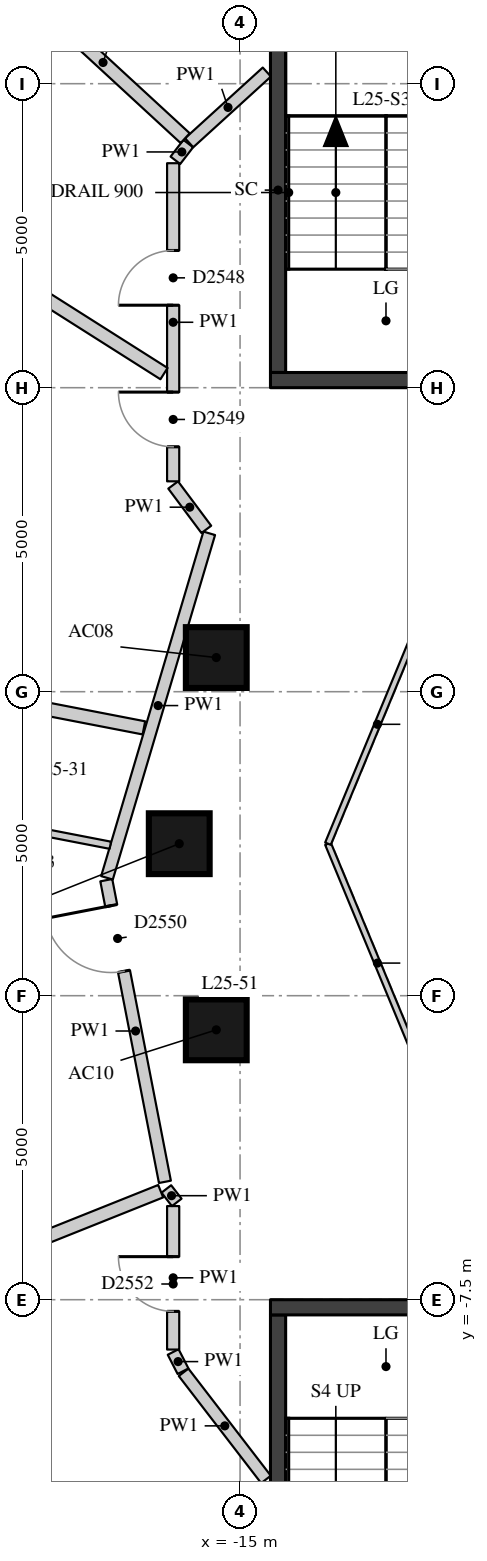
"""IFC4 building model, lengths in metres.
Left out: names, types, materials, properties, quantities, classifications, styles, units other than length and angle.
Written with IfcOpenShell. Run it as: python <this file> out.ifc"""

import sys

from ifc_helpers import new_model, si_unit, direction, frame, frame_2d, origin, origin_2d, place, context, subcontext, project, spatial, rectangle, extrude, element, fill, save


model = new_model("IFC4")
c1 = context("Model", 3, precision=1e-05, world=origin(), true_north=direction((0.0, 1.0)))
c2 = subcontext(c1, "Body", "Model", "MODEL_VIEW")
j1 = project(units=[si_unit("LENGTHUNIT", "METRE"), si_unit("PLANEANGLEUNIT", "RADIAN")], contexts=[c1])
p1 = place(None, origin())
s1 = spatial("IfcSite", under=j1, at=p1, CompositionType="ELEMENT")
p2 = place(p1, origin())
s2 = spatial("IfcBuilding", under=s1, at=p2, CompositionType="ELEMENT")
p3 = place(p2, frame((0.0, 0.0, 92.2)))
s3 = spatial("IfcBuildingStorey", under=s2, at=p3, CompositionType="ELEMENT", Elevation=92.2)
for number, where, z_axis, x_axis in (
    (1, (-15.391, 3.062, 0.0), (0.0, 0.0, 1.0), (1.0, 0.0, 0.0)),
    (2, (-16.0, 0.0, 0.0), (0.0, 0.0, 1.0), (1.0, 0.0, 0.0)),
    (3, (-15.391, -3.062, 0.0), (0.0, 0.0, 1.0), (1.0, 0.0, 0.0)),
):
    element("IfcColumn", number, at=place(p3, frame(where, z_axis=z_axis, x_axis=x_axis)), inside=s3, PredefinedType="COLUMN", context=c2, shape_type="SweptSolid", body=[
        extrude(rectangle(XDim=1.0, YDim=1.0, at=origin_2d()), origin(), (0.0, 0.0, 1.0), 3.3),
    ])
p4 = place(p3, frame((-14.375, 7.75, -0.28), z_axis=(0.0, 0.0, 1.0), x_axis=(0.0, 1.0, 0.0)))
e4 = element("IfcWall", 4, at=p4, inside=s3, PredefinedType="SHEAR", context=c2, shape_type="SweptSolid", body=[
    extrude(rectangle(XDim=6.0, YDim=0.25, at=frame_2d((3.0, 0.0))), origin(), (0.0, 0.0, 1.0), 3.3),
])
p5 = place(p3, frame((-14.5, 7.625, -0.28), z_axis=(0.0, 0.0, 1.0), x_axis=(1.0, 0.0, 0.0)))
e5 = element("IfcWall", 5, at=p5, inside=s3, PredefinedType="SHEAR", context=c2, shape_type="SweptSolid", body=[
    extrude(rectangle(XDim=5.2, YDim=0.25, at=frame_2d((2.6, 0.0))), origin(), (0.0, 0.0, 1.0), 3.3),
])
p6 = place(p3, frame((-14.375, -13.75, -0.28), z_axis=(0.0, 0.0, 1.0), x_axis=(0.0, 1.0, 0.0)))
e6 = element("IfcWall", 6, at=p6, inside=s3, PredefinedType="SHEAR", context=c2, shape_type="SweptSolid", body=[
    extrude(rectangle(XDim=6.0, YDim=0.25, at=frame_2d((3.0, 0.0))), origin(), (0.0, 0.0, 1.0), 3.3),
])
p7 = place(p3, frame((-14.5, -7.625, -0.28), z_axis=(0.0, 0.0, 1.0), x_axis=(1.0, 0.0, 0.0)))
e7 = element("IfcWall", 7, at=p7, inside=s3, PredefinedType="SHEAR", context=c2, shape_type="SweptSolid", body=[
    extrude(rectangle(XDim=5.2, YDim=0.25, at=frame_2d((2.6, 0.0))), origin(), (0.0, 0.0, 1.0), 3.3),
])
p8 = place(p3, frame((-14.573, -10.456, 0.0), z_axis=(0.0, 0.0, 1.0), x_axis=(-0.60967360535, 0.792652568872, 0.0)))
e8 = element("IfcWall", 8, at=p8, inside=s3, PredefinedType="PARTITIONING", context=c2, shape_type="SweptSolid", body=[
    extrude(rectangle(XDim=2.223, YDim=0.2, at=frame_2d((1.111, 0.0))), origin(), (0.0, 0.0, 1.0), 3.02),
])
p9 = place(p3, frame((-15.938, -8.676, 0.0), z_axis=(0.0, 0.0, 1.0), x_axis=(-0.456525695549, 0.889710227717, 0.0)))
e9 = element("IfcWall", 9, at=p9, inside=s3, PredefinedType="PARTITIONING", context=c2, shape_type="SweptSolid", body=[
    extrude(rectangle(XDim=0.356, YDim=0.2, at=frame_2d((0.178, 0.0))), origin(), (0.0, 0.0, 1.0), 3.02),
])
p10 = place(p3, frame((-16.1, -8.32, 0.0), z_axis=(0.0, 0.0, 1.0), x_axis=(0.0, 1.0, 0.0)))
e10 = element("IfcWall", 10, at=p10, inside=s3, PredefinedType="PARTITIONING", context=c2, shape_type="SweptSolid", body=[
    extrude(rectangle(XDim=2.36, YDim=0.2, at=frame_2d((1.18, 0.0))), origin(), (0.0, 0.0, 1.0), 3.02),
])
p11 = place(p10, frame((0.628, 0.0, 0.0)))
e11 = element("IfcOpeningElement", 11, at=p11, cuts=e10, PredefinedType="OPENING", context=c2, shape_type="SweptSolid", body=[
    extrude(rectangle(XDim=0.9, YDim=2.1, at=frame_2d((0.45, 1.05))), frame((0.0, 0.11, 0.0), z_axis=(0.0, -1.0, 0.0), x_axis=(1.0, 0.0, 0.0)), (0.0, 0.0, 1.0), 0.22),
])
p12 = place(p3, frame((-16.041, -5.9, 0.0), z_axis=(0.0, 0.0, 1.0), x_axis=(-0.612489897904, 0.790478415243, 0.0)))
e12 = element("IfcWall", 12, at=p12, inside=s3, PredefinedType="PARTITIONING", context=c2, shape_type="SweptSolid", body=[
    extrude(rectangle(XDim=0.28, YDim=0.2, at=frame_2d((0.14, 0.0))), origin(), (0.0, 0.0, 1.0), 3.02),
])
p13 = place(p3, frame((-16.236, -5.562, 0.0), z_axis=(0.0, 0.0, 1.0), x_axis=(-0.190753296708, 0.981638008532, 0.0)))
e13 = element("IfcWall", 13, at=p13, inside=s3, PredefinedType="PARTITIONING", context=c2, shape_type="SweptSolid", body=[
    extrude(rectangle(XDim=5.054, YDim=0.2, at=frame_2d((2.527, 0.0))), origin(), (0.0, 0.0, 1.0), 3.02),
])
p14 = place(p13, frame((3.528, 0.0, 0.0)))
e14 = element("IfcOpeningElement", 14, at=p14, cuts=e13, PredefinedType="OPENING", context=c2, shape_type="SweptSolid", body=[
    extrude(rectangle(XDim=1.1, YDim=2.1, at=frame_2d((0.55, 1.05))), frame((0.0, 0.11, 0.0), z_axis=(0.0, -1.0, 0.0), x_axis=(1.0, 0.0, 0.0)), (0.0, 0.0, 1.0), 0.22),
])
p15 = place(p3, frame((-17.189, -0.562, 0.0), z_axis=(0.0, 0.0, 1.0), x_axis=(0.28454253649, 0.95866341587, 0.0)))
e15 = element("IfcWall", 15, at=p15, inside=s3, PredefinedType="PARTITIONING", context=c2, shape_type="SweptSolid", body=[
    extrude(rectangle(XDim=5.911, YDim=0.2, at=frame_2d((2.956, 0.0))), origin(), (0.0, 0.0, 1.0), 3.02),
])
p16 = place(p3, frame((-15.555, 5.169, 0.0), z_axis=(0.0, 0.0, 1.0), x_axis=(-0.598284647233, 0.801283645712, 0.0)))
e16 = element("IfcWall", 16, at=p16, inside=s3, PredefinedType="PARTITIONING", context=c2, shape_type="SweptSolid", body=[
    extrude(rectangle(XDim=0.912, YDim=0.2, at=frame_2d((0.456, 0.0))), origin(), (0.0, 0.0, 1.0), 3.02),
])
p17 = place(p3, frame((-16.1, 5.96, 0.0), z_axis=(0.0, 0.0, 1.0), x_axis=(0.0, 1.0, 0.0)))
e17 = element("IfcWall", 17, at=p17, inside=s3, PredefinedType="PARTITIONING", context=c2, shape_type="SweptSolid", body=[
    extrude(rectangle(XDim=5.232, YDim=0.2, at=frame_2d((2.616, 0.0))), origin(), (0.0, 0.0, 1.0), 3.02),
])
p18 = place(p17, frame((2.897, 0.0, 0.0)))
e18 = element("IfcOpeningElement", 18, at=p18, cuts=e17, PredefinedType="OPENING", context=c2, shape_type="SweptSolid", body=[
    extrude(rectangle(XDim=0.9, YDim=2.1, at=frame_2d((0.45, 1.05))), frame((0.0, 0.11, 0.0), z_axis=(0.0, -1.0, 0.0), x_axis=(1.0, 0.0, 0.0)), (0.0, 0.0, 1.0), 0.22),
])
p19 = place(p17, frame((0.568, 0.0, 0.0)))
e19 = element("IfcOpeningElement", 19, at=p19, cuts=e17, PredefinedType="OPENING", context=c2, shape_type="SweptSolid", body=[
    extrude(rectangle(XDim=0.9, YDim=2.1, at=frame_2d((0.45, 1.05))), frame((0.0, 0.11, 0.0), z_axis=(0.0, -1.0, 0.0), x_axis=(1.0, 0.0, 0.0)), (0.0, 0.0, 1.0), 0.22),
])
p20 = place(p3, frame((-16.063, 11.24, 0.0), z_axis=(0.0, 0.0, 1.0), x_axis=(0.609744747854, 0.792597844096, 0.0)))
e20 = element("IfcWall", 20, at=p20, inside=s3, PredefinedType="PARTITIONING", context=c2, shape_type="SweptSolid", body=[
    extrude(rectangle(XDim=0.347, YDim=0.2, at=frame_2d((0.174, 0.0))), origin(), (0.0, 0.0, 1.0), 3.02),
])
p21 = place(p3, frame((-15.837, 11.528, 0.0), z_axis=(0.0, 0.0, 1.0), x_axis=(0.739402681643, 0.673263450946, 0.0)))
e21 = element("IfcWall", 21, at=p21, inside=s3, PredefinedType="PARTITIONING", context=c2, shape_type="SweptSolid", body=[
    extrude(rectangle(XDim=1.728, YDim=0.2, at=frame_2d((0.864, 0.0))), origin(), (0.0, 0.0, 1.0), 3.02),
])
p22 = place(p3, frame((-18.604, 14.094, 0.0), z_axis=(0.0, 0.0, 1.0), x_axis=(0.73529495628, -0.677747244383, 0.0)))
e22 = element("IfcWall", 22, at=p22, inside=s3, PredefinedType="PARTITIONING", context=c2, shape_type="SweptSolid", body=[
    extrude(rectangle(XDim=3.674, YDim=0.22, at=frame_2d((1.837, 0.0))), origin(), (0.0, 0.0, 1.0), 3.02),
])
p23 = place(p3, frame((-21.126, 10.823, 0.0), z_axis=(0.0, 0.0, 1.0), x_axis=(0.844518840625, -0.535525842355, 0.0)))
e23 = element("IfcWall", 23, at=p23, inside=s3, PredefinedType="PARTITIONING", context=c2, shape_type="SweptSolid", body=[
    extrude(rectangle(XDim=5.773, YDim=0.22, at=frame_2d((2.887, 0.0))), origin(), (0.0, 0.0, 1.0), 3.02),
])
p24 = place(p3, frame((-24.118, 3.364, 0.0), z_axis=(0.0, 0.0, 1.0), x_axis=(0.981759939745, -0.19012475039, 0.0)))
e24 = element("IfcWall", 24, at=p24, inside=s3, PredefinedType="PARTITIONING", context=c2, shape_type="SweptSolid", body=[
    extrude(rectangle(XDim=7.677, YDim=0.22, at=frame_2d((3.838, 0.0))), origin(), (0.0, 0.0, 1.0), 2.47),
])
p25 = place(p3, frame((-21.736, -7.887, 0.0), z_axis=(0.0, 0.0, 1.0), x_axis=(0.928522746632, 0.371275516277, 0.0)))
e25 = element("IfcWall", 25, at=p25, inside=s3, PredefinedType="PARTITIONING", context=c2, shape_type="SweptSolid", body=[
    extrude(rectangle(XDim=5.848, YDim=0.22, at=frame_2d((2.924, 0.0))), origin(), (0.0, 0.0, 1.0), 3.02),
])
p26 = place(p3, frame((-17.134, -0.026, 0.0), z_axis=(0.0, 0.0, 1.0), x_axis=(-0.98174757037, 0.190188611835, 0.0)))
e26 = element("IfcWall", 26, at=p26, inside=s3, PredefinedType="PARTITIONING", context=c2, shape_type="SweptSolid", body=[
    extrude(rectangle(XDim=2.504, YDim=0.12, at=frame_2d((1.252, 0.0))), origin(), (0.0, 0.0, 1.0), 3.02),
])
for number, where, z_axis, x_axis in (
    (27, (-11.927, -3.927, 0.0), (0.0, 0.0, 1.0), (-0.383, 0.924, 0.0)),
    (28, (-13.554, 0.0, 0.0), (0.0, 0.0, 1.0), (0.383, 0.924, 0.0)),
):
    element("IfcWall", number, at=place(p3, frame(where, z_axis=z_axis, x_axis=x_axis)), inside=s3, PredefinedType="PARTITIONING", context=c2, shape_type="SweptSolid", body=[
        extrude(rectangle(XDim=4.251, YDim=0.1, at=frame_2d((2.125, 0.0))), origin(), (0.0, 0.0, 1.0), 3.02),
    ])
p27 = place(p18, origin())
e29 = element("IfcDoor", 29, at=p27, inside=s3, OperationType="SINGLE_SWING_LEFT", PredefinedType="DOOR", context=c2, shape_type="SweptSolid", body=[
    extrude(rectangle(XDim=0.9, YDim=2.1, at=frame_2d((0.45, 1.05))), frame((0.0, 0.025, 0.0), z_axis=(0.0, -1.0, 0.0), x_axis=(1.0, 0.0, 0.0)), (0.0, 0.0, 1.0), 0.05),
])
fill(e18, e29)
p28 = place(p19, origin())
e30 = element("IfcDoor", 30, at=p28, inside=s3, OperationType="SINGLE_SWING_RIGHT", PredefinedType="DOOR", context=c2, shape_type="SweptSolid", body=[
    extrude(rectangle(XDim=0.9, YDim=2.1, at=frame_2d((0.45, 1.05))), frame((0.0, 0.025, 0.0), z_axis=(0.0, -1.0, 0.0), x_axis=(1.0, 0.0, 0.0)), (0.0, 0.0, 1.0), 0.05),
])
fill(e19, e30)
p29 = place(p14, origin())
e31 = element("IfcDoor", 31, at=p29, inside=s3, OperationType="SINGLE_SWING_RIGHT", PredefinedType="DOOR", context=c2, shape_type="SweptSolid", body=[
    extrude(rectangle(XDim=1.1, YDim=2.1, at=frame_2d((0.55, 1.05))), frame((0.0, 0.025, 0.0), z_axis=(0.0, -1.0, 0.0), x_axis=(1.0, 0.0, 0.0)), (0.0, 0.0, 1.0), 0.05),
])
fill(e14, e31)
p30 = place(p11, origin())
e32 = element("IfcDoor", 32, at=p30, inside=s3, OperationType="SINGLE_SWING_RIGHT", PredefinedType="DOOR", context=c2, shape_type="SweptSolid", body=[
    extrude(rectangle(XDim=0.9, YDim=2.1, at=frame_2d((0.45, 1.05))), frame((0.0, 0.025, 0.0), z_axis=(0.0, -1.0, 0.0), x_axis=(1.0, 0.0, 0.0)), (0.0, 0.0, 1.0), 0.05),
])
fill(e11, e32)
save(model, sys.argv[1])
